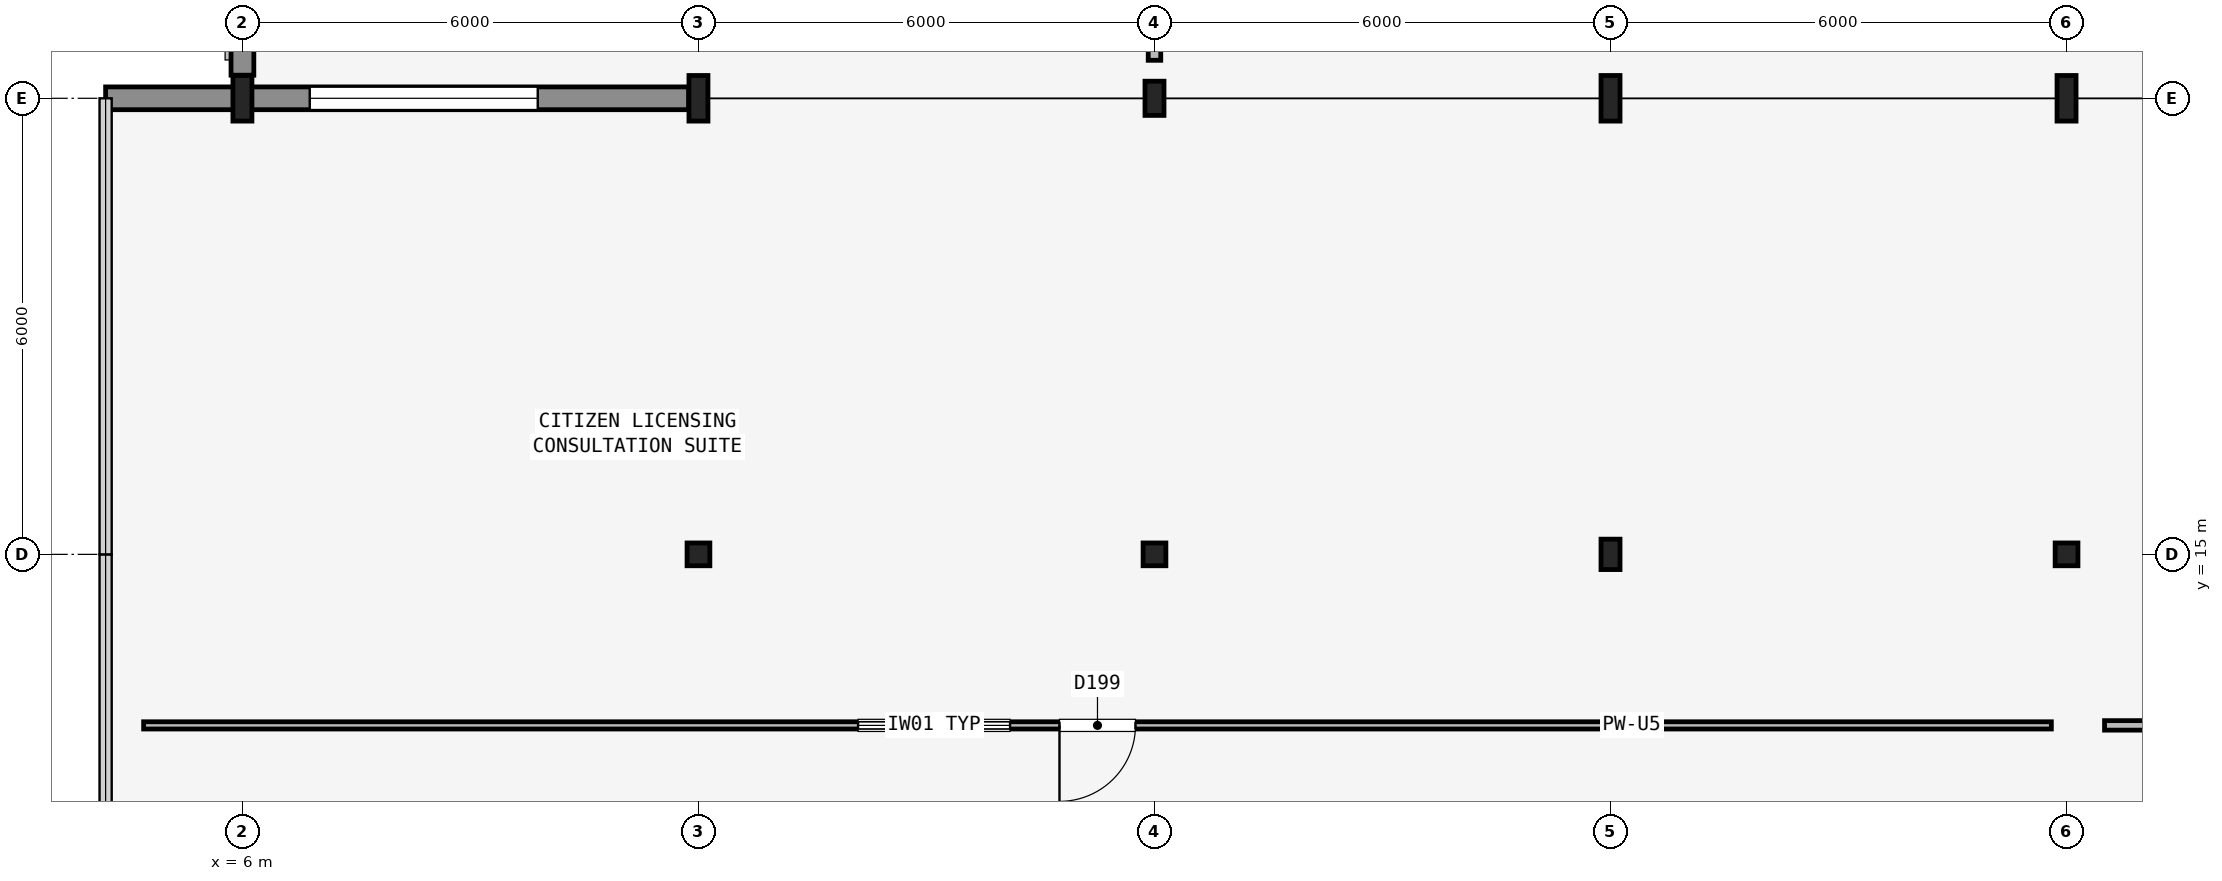
"""IFC4 building model, lengths in metres.
Left out: names, types, materials, properties, quantities, classifications, styles, units other than length and angle.
Written with IfcOpenShell. Run it as: python <this file> out.ifc"""

import sys

from ifc_helpers import new_model, si_unit, direction, frame, frame_2d, origin, origin_2d, place, context, subcontext, project, spatial, rectangle, hollow_rectangle, i_section, extrude, element, fill, save


model = new_model("IFC4")
c1 = context("Model", 3, precision=1e-05, world=origin(), true_north=direction((0.0, 1.0)))
c2 = subcontext(c1, "Body", "Model", "MODEL_VIEW")
j1 = project(units=[si_unit("LENGTHUNIT", "METRE"), si_unit("PLANEANGLEUNIT", "RADIAN")], contexts=[c1])
p1 = place(None, origin())
s1 = spatial("IfcSite", under=j1, at=p1, CompositionType="ELEMENT")
p2 = place(p1, origin())
s2 = spatial("IfcBuilding", under=s1, at=p2, CompositionType="ELEMENT")
p3 = place(p2, frame((0.0, 0.0, 4.8)))
s3 = spatial("IfcBuildingStorey", under=s2, at=p3, CompositionType="ELEMENT", Elevation=4.8)
p4 = place(p3, frame((6.0, 21.0, 0.0), z_axis=(0.0, 0.0, 1.0), x_axis=(1.0, 0.0, 0.0)))
e1 = element("IfcColumn", 1, at=p4, inside=s3, PredefinedType="COLUMN", context=c2, shape_type="SweptSolid", body=[
    extrude(i_section(OverallWidth=0.25, OverallDepth=0.6, WebThickness=0.012, FlangeThickness=0.024, FilletRadius=0.017, at=origin_2d()), origin(), (0.0, 0.0, 1.0), 4.5),
])
p5 = place(p3, frame((12.0, 15.0, 0.0), z_axis=(0.0, 0.0, 1.0), x_axis=(1.0, 0.0, 0.0)))
e2 = element("IfcColumn", 2, at=p5, inside=s3, PredefinedType="COLUMN", context=c2, shape_type="SweptSolid", body=[
    extrude(hollow_rectangle(XDim=0.3, YDim=0.3, WallThickness=0.016, InnerFilletRadius=0.016, OuterFilletRadius=0.032, at=origin_2d()), origin(), (0.0, 0.0, 1.0), 4.5),
])
p6 = place(p3, frame((12.0, 21.0, 0.0), z_axis=(0.0, 0.0, 1.0), x_axis=(1.0, 0.0, 0.0)))
e3 = element("IfcColumn", 3, at=p6, inside=s3, PredefinedType="COLUMN", context=c2, shape_type="SweptSolid", body=[
    extrude(i_section(OverallWidth=0.25, OverallDepth=0.6, WebThickness=0.012, FlangeThickness=0.024, FilletRadius=0.017, at=origin_2d()), origin(), (0.0, 0.0, 1.0), 4.5),
])
p7 = place(p3, frame((18.0, 15.0, 0.0), z_axis=(0.0, 0.0, 1.0), x_axis=(1.0, 0.0, 0.0)))
e4 = element("IfcColumn", 4, at=p7, inside=s3, PredefinedType="COLUMN", context=c2, shape_type="SweptSolid", body=[
    extrude(hollow_rectangle(XDim=0.3, YDim=0.3, WallThickness=0.016, InnerFilletRadius=0.016, OuterFilletRadius=0.032, at=origin_2d()), origin(), (0.0, 0.0, 1.0), 4.5),
])
p8 = place(p3, frame((18.0, 21.0, 0.0), z_axis=(0.0, 0.0, 1.0), x_axis=(1.0, 0.0, 0.0)))
e5 = element("IfcColumn", 5, at=p8, inside=s3, PredefinedType="COLUMN", context=c2, shape_type="SweptSolid", body=[
    extrude(i_section(OverallWidth=0.25, OverallDepth=0.45, WebThickness=0.011, FlangeThickness=0.014, FilletRadius=0.015, at=origin_2d()), origin(), (0.0, 0.0, 1.0), 4.5),
])
p9 = place(p3, frame((24.0, 15.0, 0.0), z_axis=(0.0, 0.0, 1.0), x_axis=(1.0, 0.0, 0.0)))
e6 = element("IfcColumn", 6, at=p9, inside=s3, PredefinedType="COLUMN", context=c2, shape_type="SweptSolid", body=[
    extrude(i_section(OverallWidth=0.25, OverallDepth=0.4, WebThickness=0.01, FlangeThickness=0.013, FilletRadius=0.014, at=origin_2d()), origin(), (0.0, 0.0, 1.0), 4.5),
])
p10 = place(p3, frame((24.0, 21.0, 0.0), z_axis=(0.0, 0.0, 1.0), x_axis=(1.0, 0.0, 0.0)))
e7 = element("IfcColumn", 7, at=p10, inside=s3, PredefinedType="COLUMN", context=c2, shape_type="SweptSolid", body=[
    extrude(i_section(OverallWidth=0.25, OverallDepth=0.6, WebThickness=0.012, FlangeThickness=0.024, FilletRadius=0.017, at=origin_2d()), origin(), (0.0, 0.0, 1.0), 4.5),
])
p11 = place(p3, frame((30.0, 15.0, 0.0), z_axis=(0.0, 0.0, 1.0), x_axis=(1.0, 0.0, 0.0)))
e8 = element("IfcColumn", 8, at=p11, inside=s3, PredefinedType="COLUMN", context=c2, shape_type="SweptSolid", body=[
    extrude(hollow_rectangle(XDim=0.3, YDim=0.3, WallThickness=0.016, InnerFilletRadius=0.016, OuterFilletRadius=0.032, at=origin_2d()), origin(), (0.0, 0.0, 1.0), 4.5),
])
p12 = place(p3, frame((30.0, 21.0, 0.0), z_axis=(0.0, 0.0, 1.0), x_axis=(1.0, 0.0, 0.0)))
e9 = element("IfcColumn", 9, at=p12, inside=s3, PredefinedType="COLUMN", context=c2, shape_type="SweptSolid", body=[
    extrude(i_section(OverallWidth=0.25, OverallDepth=0.6, WebThickness=0.012, FlangeThickness=0.024, FilletRadius=0.017, at=origin_2d()), origin(), (0.0, 0.0, 1.0), 4.5),
])
p13 = place(p3, frame((4.2, 21.0, 0.0), z_axis=(0.0, 0.0, 1.0), x_axis=(1.0, 0.0, 0.0)))
e10 = element("IfcWall", 10, at=p13, inside=s3, PredefinedType="SOLIDWALL", context=c2, shape_type="SweptSolid", body=[
    extrude(rectangle(XDim=7.671, YDim=0.3, at=frame_2d((3.835, 0.0))), origin(), (0.0, 0.0, 1.0), 3.19),
])
p14 = place(p13, frame((2.686, 0.0, 0.9)))
e11 = element("IfcOpeningElement", 11, at=p14, cuts=e10, PredefinedType="OPENING", context=c2, shape_type="SweptSolid", body=[
    extrude(rectangle(XDim=3.0, YDim=1.5, at=frame_2d((1.5, 0.75))), frame((0.0, 0.16, 0.0), z_axis=(0.0, -1.0, 0.0), x_axis=(1.0, 0.0, 0.0)), (0.0, 0.0, 1.0), 0.32),
])
p15 = place(p3, frame((6.0, 21.304, 0.0), z_axis=(0.0, 0.0, 1.0), x_axis=(0.0, 1.0, 0.0)))
e12 = element("IfcWall", 12, at=p15, inside=s3, PredefinedType="SOLIDWALL", context=c2, shape_type="SweptSolid", body=[
    extrude(rectangle(XDim=5.392, YDim=0.3, at=frame_2d((2.696, 0.0))), origin(), (0.0, 0.0, 1.0), 3.19),
])
p16 = place(p3, frame((29.8, 12.75, 0.0), z_axis=(0.0, 0.0, 1.0), x_axis=(-1.0, 0.0, 0.0)))
e13 = element("IfcWall", 13, at=p16, inside=s3, PredefinedType="PARTITIONING", context=c2, shape_type="SweptSolid", body=[
    extrude(rectangle(XDim=25.1, YDim=0.095, at=frame_2d((12.55, 0.0))), origin(), (0.0, 0.0, 1.0), 3.783),
])
p17 = place(p16, frame((12.05, 0.0, 0.0)))
e14 = element("IfcOpeningElement", 14, at=p17, cuts=e13, PredefinedType="OPENING", context=c2, shape_type="SweptSolid", body=[
    extrude(rectangle(XDim=1.0, YDim=2.15, at=frame_2d((0.5, 1.075))), frame((0.0, 0.057, 0.0), z_axis=(0.0, -1.0, 0.0), x_axis=(1.0, 0.0, 0.0)), (0.0, 0.0, 1.0), 0.115),
])
p18 = place(p16, frame((13.7, 0.0, 1.0)))
e15 = element("IfcOpeningElement", 15, at=p18, cuts=e13, PredefinedType="OPENING", context=c2, shape_type="SweptSolid", body=[
    extrude(rectangle(XDim=2.0, YDim=1.2, at=frame_2d((1.0, 0.6))), frame((0.0, 0.057, 0.0), z_axis=(0.0, -1.0, 0.0), x_axis=(1.0, 0.0, 0.0)), (0.0, 0.0, 1.0), 0.115),
])
p19 = place(p3, frame((43.9, 12.75, 0.0), z_axis=(0.0, 0.0, 1.0), x_axis=(-1.0, 0.0, 0.0)))
e16 = element("IfcWall", 16, at=p19, inside=s3, PredefinedType="PARTITIONING", context=c2, shape_type="SweptSolid", body=[
    extrude(rectangle(XDim=13.4, YDim=0.125, at=frame_2d((6.7, 0.0))), origin(), (0.0, 0.0, 1.0), 3.783),
])
p20 = place(p19, frame((6.24, 0.0, 0.0)))
e17 = element("IfcOpeningElement", 17, at=p20, cuts=e16, PredefinedType="OPENING", context=c2, shape_type="SweptSolid", body=[
    extrude(rectangle(XDim=0.92, YDim=2.1, at=frame_2d((0.46, 1.05))), frame((0.0, 0.073, 0.0), z_axis=(0.0, -1.0, 0.0), x_axis=(1.0, 0.0, 0.0)), (0.0, 0.0, 1.0), 0.145),
])
p21 = place(p19, frame((7.81, 0.0, 1.0)))
e18 = element("IfcOpeningElement", 18, at=p21, cuts=e16, PredefinedType="OPENING", context=c2, shape_type="SweptSolid", body=[
    extrude(rectangle(XDim=2.6, YDim=1.2, at=frame_2d((1.3, 0.6))), frame((0.0, 0.073, 0.0), z_axis=(0.0, -1.0, 0.0), x_axis=(1.0, 0.0, 0.0)), (0.0, 0.0, 1.0), 0.145),
])
p22 = place(p3, frame((18.0, 21.5, 0.0), z_axis=(0.0, 0.0, 1.0), x_axis=(0.0, 1.0, 0.0)))
e19 = element("IfcWall", 19, at=p22, inside=s3, PredefinedType="PARTITIONING", context=c2, shape_type="SweptSolid", body=[
    extrude(rectangle(XDim=17.0, YDim=0.165, at=frame_2d((8.5, 0.0))), origin(), (0.0, 0.0, 1.0), 3.69),
])
p23 = place(p22, frame((7.85, 0.0, 0.0)))
e20 = element("IfcOpeningElement", 20, at=p23, cuts=e19, PredefinedType="OPENING", context=c2, shape_type="SweptSolid", body=[
    extrude(rectangle(XDim=1.3, YDim=2.2, at=frame_2d((0.65, 1.1))), frame((0.0, 0.093, 0.0), z_axis=(0.0, -1.0, 0.0), x_axis=(1.0, 0.0, 0.0)), (0.0, 0.0, 1.0), 0.185),
])
p24 = place(p14, origin())
e21 = element("IfcWindow", 21, at=p24, inside=s3, PartitioningType="SINGLE_PANEL", PredefinedType="WINDOW", context=c2, shape_type="SweptSolid", body=[
    extrude(rectangle(XDim=3.0, YDim=1.5, at=frame_2d((1.5, 0.75))), frame((0.0, 0.03, 0.0), z_axis=(0.0, -1.0, 0.0), x_axis=(1.0, 0.0, 0.0)), (0.0, 0.0, 1.0), 0.06),
])
fill(e11, e21)
p25 = place(p17, origin())
e22 = element("IfcDoor", 22, at=p25, inside=s3, OperationType="SINGLE_SWING_RIGHT", PredefinedType="DOOR", context=c2, shape_type="SweptSolid", body=[
    extrude(rectangle(XDim=1.0, YDim=2.15, at=frame_2d((0.5, 1.075))), frame((0.0, 0.025, 0.0), z_axis=(0.0, -1.0, 0.0), x_axis=(1.0, 0.0, 0.0)), (0.0, 0.0, 1.0), 0.05),
])
fill(e14, e22)
p26 = place(p18, origin())
e23 = element("IfcWindow", 23, at=p26, inside=s3, PartitioningType="SINGLE_PANEL", PredefinedType="WINDOW", context=c2, shape_type="SweptSolid", body=[
    extrude(rectangle(XDim=2.0, YDim=1.2, at=frame_2d((1.0, 0.6))), frame((0.0, 0.03, 0.0), z_axis=(0.0, -1.0, 0.0), x_axis=(1.0, 0.0, 0.0)), (0.0, 0.0, 1.0), 0.06),
])
fill(e15, e23)
save(model, sys.argv[1])
